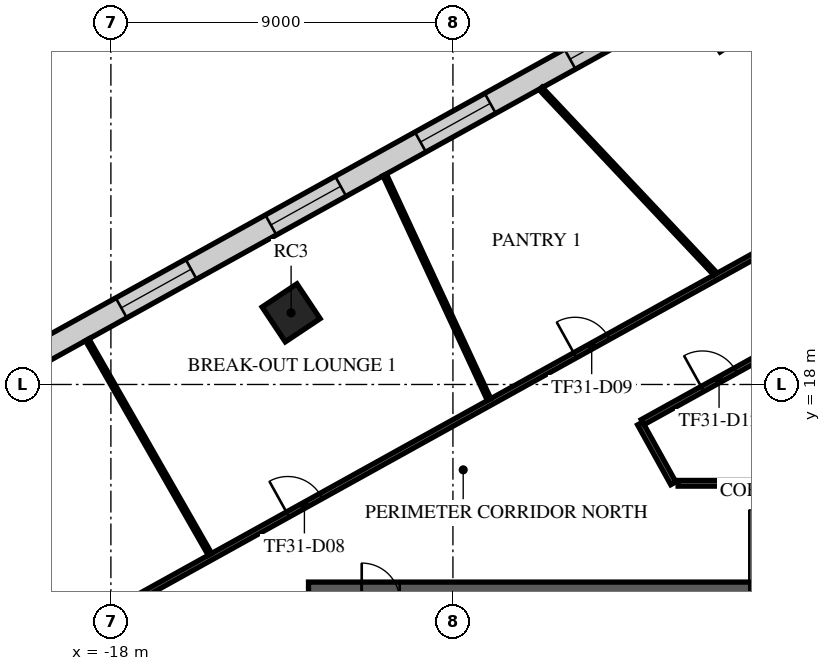
"""IFC4 building model, lengths in metres.
Left out: names, types, materials, properties, quantities, classifications, styles, units other than length and angle.
Written with IfcOpenShell. Run it as: python <this file> out.ifc"""

import sys

from ifc_helpers import new_model, si_unit, direction, frame, frame_2d, origin, origin_2d, place, context, subcontext, project, spatial, rectangle, extrude, element, fill, save


model = new_model("IFC4")
c1 = context("Model", 3, precision=1e-05, world=origin(), true_north=direction((0.0, 1.0)))
c2 = subcontext(c1, "Body", "Model", "MODEL_VIEW")
j1 = project(units=[si_unit("LENGTHUNIT", "METRE"), si_unit("PLANEANGLEUNIT", "RADIAN")], contexts=[c1])
p1 = place(None, origin())
s1 = spatial("IfcSite", under=j1, at=p1, CompositionType="ELEMENT")
p2 = place(p1, origin())
s2 = spatial("IfcBuilding", under=s1, at=p2, CompositionType="ELEMENT")
p3 = place(p2, frame((0.0, 0.0, 139.7)))
s3 = spatial("IfcBuildingStorey", under=s2, at=p3, CompositionType="ELEMENT", Elevation=139.7)
p4 = place(p3, frame((-13.258, 19.885, 0.0), z_axis=(0.0, 0.0, 1.0), x_axis=(0.832028680356, 0.55473261583, 0.0)))
e1 = element("IfcColumn", 1, at=p4, inside=s3, PredefinedType="COLUMN", context=c2, shape_type="SweptSolid", body=[
    extrude(rectangle(XDim=1.1, YDim=1.1, at=origin_2d()), origin(), (0.0, 0.0, 1.0), 4.0),
])
p5 = place(p3, frame((-12.8, 12.3, 0.0), z_axis=(0.0, 0.0, 1.0), x_axis=(1.0, 0.0, 0.0)))
e2 = element("IfcWall", 2, at=p5, inside=s3, PredefinedType="SHEAR", context=c2, shape_type="SweptSolid", body=[
    extrude(rectangle(XDim=25.6, YDim=1.0, at=frame_2d((12.8, 0.0))), origin(), (0.0, 0.0, 1.0), 3.6),
])
p6 = place(p5, frame((11.6, 0.0, 0.0)))
e3 = element("IfcOpeningElement", 3, at=p6, cuts=e2, PredefinedType="OPENING", context=c2, shape_type="SweptSolid", body=[
    extrude(rectangle(XDim=2.4, YDim=2.4, at=frame_2d((1.2, 1.2))), frame((0.0, 0.51, 0.0), z_axis=(0.0, -1.0, 0.0), x_axis=(1.0, 0.0, 0.0)), (0.0, 0.0, 1.0), 1.02),
])
p7 = place(p5, frame((22.425, 0.0, 0.0)))
e4 = element("IfcOpeningElement", 4, at=p7, cuts=e2, PredefinedType="OPENING", context=c2, shape_type="SweptSolid", body=[
    extrude(rectangle(XDim=1.2, YDim=2.1, at=frame_2d((0.6, 1.05))), frame((0.0, 0.51, 0.0), z_axis=(0.0, -1.0, 0.0), x_axis=(1.0, 0.0, 0.0)), (0.0, 0.0, 1.0), 1.02),
])
p8 = place(p5, frame((1.4, 0.0, 0.0)))
e5 = element("IfcOpeningElement", 5, at=p8, cuts=e2, PredefinedType="OPENING", context=c2, shape_type="SweptSolid", body=[
    extrude(rectangle(XDim=1.0, YDim=2.1, at=frame_2d((0.5, 1.05))), frame((0.0, 0.51, 0.0), z_axis=(0.0, -1.0, 0.0), x_axis=(1.0, 0.0, 0.0)), (0.0, 0.0, 1.0), 1.02),
])
p9 = place(p3, frame((8.775, 34.705, 0.0), z_axis=(0.0, 0.0, 1.0), x_axis=(-0.874620778241, -0.484807687922, 0.0)))
e6 = element("IfcWall", 6, at=p9, inside=s3, PredefinedType="STANDARD", context=c2, shape_type="SweptSolid", body=[
    extrude(rectangle(XDim=49.376, YDim=0.6, at=frame_2d((24.688, 0.0))), origin(), (0.0, 0.0, 1.0), 3.6),
])
p10 = place(p9, frame((1.2, 0.0, 0.9)))
e7 = element("IfcOpeningElement", 7, at=p10, cuts=e6, PredefinedType="OPENING", context=c2, shape_type="SweptSolid", body=[
    extrude(rectangle(XDim=2.1, YDim=2.1, at=frame_2d((1.05, 1.05))), frame((0.0, 0.31, 0.0), z_axis=(0.0, -1.0, 0.0), x_axis=(1.0, 0.0, 0.0)), (0.0, 0.0, 1.0), 0.62),
])
p11 = place(p9, frame((5.7, 0.0, 0.9)))
e8 = element("IfcOpeningElement", 8, at=p11, cuts=e6, PredefinedType="OPENING", context=c2, shape_type="SweptSolid", body=[
    extrude(rectangle(XDim=2.1, YDim=2.1, at=frame_2d((1.05, 1.05))), frame((0.0, 0.31, 0.0), z_axis=(0.0, -1.0, 0.0), x_axis=(1.0, 0.0, 0.0)), (0.0, 0.0, 1.0), 0.62),
])
p12 = place(p9, frame((14.7, 0.0, 0.9)))
e9 = element("IfcOpeningElement", 9, at=p12, cuts=e6, PredefinedType="OPENING", context=c2, shape_type="SweptSolid", body=[
    extrude(rectangle(XDim=2.1, YDim=2.1, at=frame_2d((1.05, 1.05))), frame((0.0, 0.31, 0.0), z_axis=(0.0, -1.0, 0.0), x_axis=(1.0, 0.0, 0.0)), (0.0, 0.0, 1.0), 0.62),
])
p13 = place(p9, frame((19.2, 0.0, 0.9)))
e10 = element("IfcOpeningElement", 10, at=p13, cuts=e6, PredefinedType="OPENING", context=c2, shape_type="SweptSolid", body=[
    extrude(rectangle(XDim=2.1, YDim=2.1, at=frame_2d((1.05, 1.05))), frame((0.0, 0.31, 0.0), z_axis=(0.0, -1.0, 0.0), x_axis=(1.0, 0.0, 0.0)), (0.0, 0.0, 1.0), 0.62),
])
p14 = place(p9, frame((23.7, 0.0, 0.9)))
e11 = element("IfcOpeningElement", 11, at=p14, cuts=e6, PredefinedType="OPENING", context=c2, shape_type="SweptSolid", body=[
    extrude(rectangle(XDim=2.1, YDim=2.1, at=frame_2d((1.05, 1.05))), frame((0.0, 0.31, 0.0), z_axis=(0.0, -1.0, 0.0), x_axis=(1.0, 0.0, 0.0)), (0.0, 0.0, 1.0), 0.62),
])
p15 = place(p9, frame((28.2, 0.0, 0.9)))
e12 = element("IfcOpeningElement", 12, at=p15, cuts=e6, PredefinedType="OPENING", context=c2, shape_type="SweptSolid", body=[
    extrude(rectangle(XDim=2.1, YDim=2.1, at=frame_2d((1.05, 1.05))), frame((0.0, 0.31, 0.0), z_axis=(0.0, -1.0, 0.0), x_axis=(1.0, 0.0, 0.0)), (0.0, 0.0, 1.0), 0.62),
])
p16 = place(p9, frame((32.7, 0.0, 0.9)))
e13 = element("IfcOpeningElement", 13, at=p16, cuts=e6, PredefinedType="OPENING", context=c2, shape_type="SweptSolid", body=[
    extrude(rectangle(XDim=2.1, YDim=2.1, at=frame_2d((1.05, 1.05))), frame((0.0, 0.31, 0.0), z_axis=(0.0, -1.0, 0.0), x_axis=(1.0, 0.0, 0.0)), (0.0, 0.0, 1.0), 0.62),
])
p17 = place(p9, frame((37.2, 0.0, 0.9)))
e14 = element("IfcOpeningElement", 14, at=p17, cuts=e6, PredefinedType="OPENING", context=c2, shape_type="SweptSolid", body=[
    extrude(rectangle(XDim=2.1, YDim=2.1, at=frame_2d((1.05, 1.05))), frame((0.0, 0.31, 0.0), z_axis=(0.0, -1.0, 0.0), x_axis=(1.0, 0.0, 0.0)), (0.0, 0.0, 1.0), 0.62),
])
p18 = place(p9, frame((41.7, 0.0, 0.9)))
e15 = element("IfcOpeningElement", 15, at=p18, cuts=e6, PredefinedType="OPENING", context=c2, shape_type="SweptSolid", body=[
    extrude(rectangle(XDim=2.1, YDim=2.1, at=frame_2d((1.05, 1.05))), frame((0.0, 0.31, 0.0), z_axis=(0.0, -1.0, 0.0), x_axis=(1.0, 0.0, 0.0)), (0.0, 0.0, 1.0), 0.62),
])
p19 = place(p9, frame((46.138, 0.0, 0.9)))
e16 = element("IfcOpeningElement", 16, at=p19, cuts=e6, PredefinedType="OPENING", context=c2, shape_type="SweptSolid", body=[
    extrude(rectangle(XDim=2.1, YDim=2.1, at=frame_2d((1.05, 1.05))), frame((0.0, 0.31, 0.0), z_axis=(0.0, -1.0, 0.0), x_axis=(1.0, 0.0, 0.0)), (0.0, 0.0, 1.0), 0.62),
])
p20 = place(p3, frame((-23.187, 9.123, 0.0), z_axis=(0.0, 0.0, 1.0), x_axis=(0.874618419846, 0.484811942578, 0.0)))
e17 = element("IfcWall", 17, at=p20, inside=s3, PredefinedType="PARTITIONING", context=c2, shape_type="SweptSolid", body=[
    extrude(rectangle(XDim=31.713, YDim=0.15, at=frame_2d((15.857, 0.0))), origin(), (0.0, 0.0, 1.0), 3.15),
])
p21 = place(p20, frame((11.252, 0.0, 0.0)))
e18 = element("IfcOpeningElement", 18, at=p21, cuts=e17, PredefinedType="OPENING", context=c2, shape_type="SweptSolid", body=[
    extrude(rectangle(XDim=1.0, YDim=2.1, at=frame_2d((0.5, 1.05))), frame((0.0, 0.085, 0.0), z_axis=(0.0, -1.0, 0.0), x_axis=(1.0, 0.0, 0.0)), (0.0, 0.0, 1.0), 0.17),
])
p22 = place(p20, frame((19.896, 0.0, 0.0)))
e19 = element("IfcOpeningElement", 19, at=p22, cuts=e17, PredefinedType="OPENING", context=c2, shape_type="SweptSolid", body=[
    extrude(rectangle(XDim=1.0, YDim=2.1, at=frame_2d((0.5, 1.05))), frame((0.0, 0.085, 0.0), z_axis=(0.0, -1.0, 0.0), x_axis=(1.0, 0.0, 0.0)), (0.0, 0.0, 1.0), 0.17),
])
p23 = place(p20, frame((29.223, 0.0, 0.0)))
e20 = element("IfcOpeningElement", 20, at=p23, cuts=e17, PredefinedType="OPENING", context=c2, shape_type="SweptSolid", body=[
    extrude(rectangle(XDim=1.0, YDim=2.1, at=frame_2d((0.5, 1.05))), frame((0.0, 0.085, 0.0), z_axis=(0.0, -1.0, 0.0), x_axis=(1.0, 0.0, 0.0)), (0.0, 0.0, 1.0), 0.17),
])
p24 = place(p3, frame((-4.074, 16.973, 0.0), z_axis=(0.0, 0.0, 1.0), x_axis=(0.484870548803, -0.874585931114, 0.0)))
e21 = element("IfcWall", 21, at=p24, inside=s3, PredefinedType="PARTITIONING", context=c2, shape_type="SweptSolid", body=[
    extrude(rectangle(XDim=1.799, YDim=0.15, at=frame_2d((0.899, 0.0))), origin(), (0.0, 0.0, 1.0), 3.6),
])
p25 = place(p3, frame((-4.008, 17.01, 0.0), z_axis=(0.0, 0.0, 1.0), x_axis=(0.874611645774, 0.484824163049, 0.0)))
e22 = element("IfcWall", 22, at=p25, inside=s3, PredefinedType="PARTITIONING", context=c2, shape_type="SweptSolid", body=[
    extrude(rectangle(XDim=11.041, YDim=0.15, at=frame_2d((5.521, 0.0))), origin(), (0.0, 0.0, 1.0), 3.15),
])
p26 = place(p25, frame((1.8, 0.0, 0.0)))
e23 = element("IfcOpeningElement", 23, at=p26, cuts=e22, PredefinedType="OPENING", context=c2, shape_type="SweptSolid", body=[
    extrude(rectangle(XDim=1.0, YDim=2.1, at=frame_2d((0.5, 1.05))), frame((0.0, 0.085, 0.0), z_axis=(0.0, -1.0, 0.0), x_axis=(1.0, 0.0, 0.0)), (0.0, 0.0, 1.0), 0.17),
])
p27 = place(p3, frame((-3.075, 15.4, 0.0), z_axis=(0.0, 0.0, 1.0), x_axis=(1.0, 0.0, 0.0)))
e24 = element("IfcWall", 24, at=p27, inside=s3, PredefinedType="PARTITIONING", context=c2, shape_type="SweptSolid", body=[
    extrude(rectangle(XDim=17.886, YDim=0.15, at=frame_2d((8.943, 0.0))), origin(), (0.0, 0.0, 1.0), 3.15),
])
p28 = place(p27, frame((10.17, 0.0, 0.0)))
e25 = element("IfcOpeningElement", 25, at=p28, cuts=e24, PredefinedType="OPENING", context=c2, shape_type="SweptSolid", body=[
    extrude(rectangle(XDim=1.8, YDim=2.1, at=frame_2d((0.9, 1.05))), frame((0.0, 0.085, 0.0), z_axis=(0.0, -1.0, 0.0), x_axis=(1.0, 0.0, 0.0)), (0.0, 0.0, 1.0), 0.17),
])
p29 = place(p3, frame((-18.622, 19.174, 0.0), z_axis=(0.0, 0.0, 1.0), x_axis=(0.496555361039, -0.8680050538, 0.0)))
e26 = element("IfcWall", 26, at=p29, inside=s3, PredefinedType="PARTITIONING", context=c2, shape_type="SweptSolid", body=[
    extrude(rectangle(XDim=6.502, YDim=0.1, at=frame_2d((3.251, 0.0))), origin(), (0.0, 0.0, 1.0), 3.15),
])
p30 = place(p3, frame((-10.795, 23.513, 0.0), z_axis=(0.0, 0.0, 1.0), x_axis=(0.42134027537, -0.906902625617, 0.0)))
e27 = element("IfcWall", 27, at=p30, inside=s3, PredefinedType="PARTITIONING", context=c2, shape_type="SweptSolid", body=[
    extrude(rectangle(XDim=6.516, YDim=0.1, at=frame_2d((3.258, 0.0))), origin(), (0.0, 0.0, 1.0), 3.15),
])
p31 = place(p3, frame((-6.691, 25.788, 0.0), z_axis=(0.0, 0.0, 1.0), x_axis=(0.685723912774, -0.727861741988, 0.0)))
e28 = element("IfcWall", 28, at=p31, inside=s3, PredefinedType="PARTITIONING", context=c2, shape_type="SweptSolid", body=[
    extrude(rectangle(XDim=6.698, YDim=0.1, at=frame_2d((3.349, 0.0))), origin(), (0.0, 0.0, 1.0), 3.15),
])
p32 = place(p12, origin())
e29 = element("IfcWindow", 29, at=p32, inside=s3, PartitioningType="SINGLE_PANEL", PredefinedType="WINDOW", context=c2, shape_type="SweptSolid", body=[
    extrude(rectangle(XDim=2.1, YDim=2.1, at=frame_2d((1.05, 1.05))), frame((0.0, 0.03, 0.0), z_axis=(0.0, -1.0, 0.0), x_axis=(1.0, 0.0, 0.0)), (0.0, 0.0, 1.0), 0.06),
])
fill(e9, e29)
p33 = place(p13, origin())
e30 = element("IfcWindow", 30, at=p33, inside=s3, PartitioningType="SINGLE_PANEL", PredefinedType="WINDOW", context=c2, shape_type="SweptSolid", body=[
    extrude(rectangle(XDim=2.1, YDim=2.1, at=frame_2d((1.05, 1.05))), frame((0.0, 0.03, 0.0), z_axis=(0.0, -1.0, 0.0), x_axis=(1.0, 0.0, 0.0)), (0.0, 0.0, 1.0), 0.06),
])
fill(e10, e30)
p34 = place(p14, origin())
e31 = element("IfcWindow", 31, at=p34, inside=s3, PartitioningType="SINGLE_PANEL", PredefinedType="WINDOW", context=c2, shape_type="SweptSolid", body=[
    extrude(rectangle(XDim=2.1, YDim=2.1, at=frame_2d((1.05, 1.05))), frame((0.0, 0.03, 0.0), z_axis=(0.0, -1.0, 0.0), x_axis=(1.0, 0.0, 0.0)), (0.0, 0.0, 1.0), 0.06),
])
fill(e11, e31)
p35 = place(p15, origin())
e32 = element("IfcWindow", 32, at=p35, inside=s3, PartitioningType="SINGLE_PANEL", PredefinedType="WINDOW", context=c2, shape_type="SweptSolid", body=[
    extrude(rectangle(XDim=2.1, YDim=2.1, at=frame_2d((1.05, 1.05))), frame((0.0, 0.03, 0.0), z_axis=(0.0, -1.0, 0.0), x_axis=(1.0, 0.0, 0.0)), (0.0, 0.0, 1.0), 0.06),
])
fill(e12, e32)
p36 = place(p21, origin())
e33 = element("IfcDoor", 33, at=p36, inside=s3, OperationType="SINGLE_SWING_RIGHT", PredefinedType="DOOR", context=c2, shape_type="SweptSolid", body=[
    extrude(rectangle(XDim=1.0, YDim=2.1, at=frame_2d((0.5, 1.05))), frame((0.0, 0.025, 0.0), z_axis=(0.0, -1.0, 0.0), x_axis=(1.0, 0.0, 0.0)), (0.0, 0.0, 1.0), 0.05),
])
fill(e18, e33)
p37 = place(p22, origin())
e34 = element("IfcDoor", 34, at=p37, inside=s3, OperationType="SINGLE_SWING_LEFT", PredefinedType="DOOR", context=c2, shape_type="SweptSolid", body=[
    extrude(rectangle(XDim=1.0, YDim=2.1, at=frame_2d((0.5, 1.05))), frame((0.0, 0.025, 0.0), z_axis=(0.0, -1.0, 0.0), x_axis=(1.0, 0.0, 0.0)), (0.0, 0.0, 1.0), 0.05),
])
fill(e19, e34)
p38 = place(p26, frame((1.0, 0.0, 0.0), z_axis=(0.0, 0.0, 1.0), x_axis=(-1.0, 0.0, 0.0)))
e35 = element("IfcDoor", 35, at=p38, inside=s3, OperationType="SINGLE_SWING_RIGHT", PredefinedType="DOOR", context=c2, shape_type="SweptSolid", body=[
    extrude(rectangle(XDim=1.0, YDim=2.1, at=frame_2d((0.5, 1.05))), frame((0.0, 0.025, 0.0), z_axis=(0.0, -1.0, 0.0), x_axis=(1.0, 0.0, 0.0)), (0.0, 0.0, 1.0), 0.05),
])
fill(e23, e35)
save(model, sys.argv[1])
